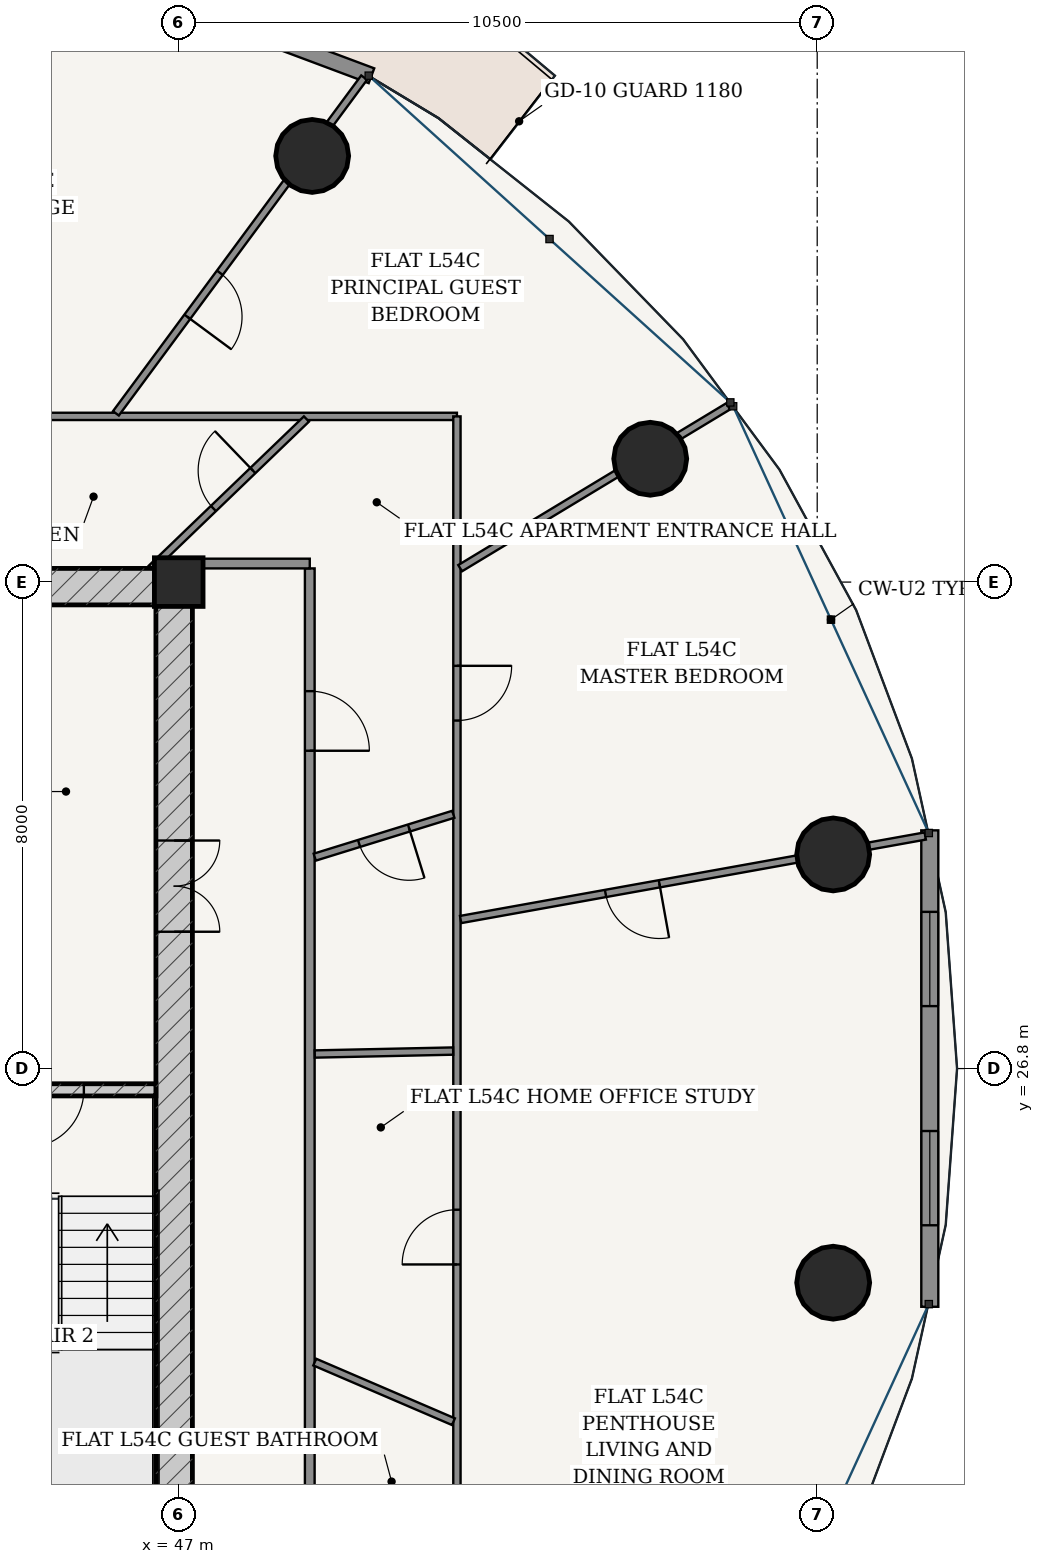
"""IFC4 building model, lengths in metres.
Left out: names, types, materials, properties, quantities, classifications, styles, units other than length and angle.
Written with IfcOpenShell. Run it as: python <this file> out.ifc"""

import sys

from ifc_helpers import new_model, si_unit, direction, frame, frame_2d, origin, origin_2d, place, context, subcontext, project, spatial, rectangle, hollow_circle, extrude, source, transform, mapped, element, fill, save


model = new_model("IFC4")
c1 = context("Model", 3, precision=1e-05, world=origin(), true_north=direction((-0.2419218956, 0.970295726276)))
c2 = subcontext(c1, "Body", "Model", "MODEL_VIEW")
j1 = project(units=[si_unit("LENGTHUNIT", "METRE"), si_unit("PLANEANGLEUNIT", "RADIAN")], contexts=[c1])
p1 = place(None, origin())
s1 = spatial("IfcSite", under=j1, at=p1, CompositionType="ELEMENT")
p2 = place(p1, origin())
s2 = spatial("IfcBuilding", under=s1, at=p2, CompositionType="ELEMENT")
p3 = place(p2, frame((0.0, 0.0, 206.0)))
s3 = spatial("IfcBuildingStorey", under=s2, at=p3, CompositionType="ELEMENT", Elevation=206.0)
p4 = place(p3, frame((47.0, 34.8, 0.0), z_axis=(0.0, 0.0, 1.0), x_axis=(1.0, 0.0, 0.0)))
e1 = element("IfcColumn", 1, at=p4, inside=s3, PredefinedType="COLUMN", context=c2, shape_type="SweptSolid", body=[
    extrude(rectangle(XDim=0.8, YDim=0.8, at=origin_2d()), origin(), (0.0, 0.0, 1.0), 3.7),
])
p5 = place(p3, frame((28.775, 34.725, 0.0), z_axis=(0.0, 0.0, 1.0), x_axis=(1.0, 0.0, 0.0)))
e2 = element("IfcWall", 2, at=p5, inside=s3, PredefinedType="SHEAR", context=c2, shape_type="SweptSolid", body=[
    extrude(rectangle(XDim=18.45, YDim=0.6, at=frame_2d((9.225, 0.0))), origin(), (0.0, 0.0, 1.0), 3.435),
])
p6 = place(p3, frame((46.925, 19.175, 0.0), z_axis=(0.0, 0.0, 1.0), x_axis=(0.0, 1.0, 0.0)))
e3 = element("IfcWall", 3, at=p6, inside=s3, PredefinedType="SHEAR", context=c2, shape_type="SweptSolid", body=[
    extrude(rectangle(XDim=15.25, YDim=0.6, at=frame_2d((7.625, 0.0))), origin(), (0.0, 0.0, 1.0), 3.435),
])
p7 = place(p6, frame((9.875, 0.0, 0.0)))
e4 = element("IfcOpeningElement", 4, at=p7, cuts=e3, PredefinedType="OPENING", context=c2, shape_type="SweptSolid", body=[
    extrude(rectangle(XDim=1.5, YDim=2.2, at=frame_2d((0.75, 1.1))), frame((0.0, 0.31, 0.0), z_axis=(0.0, -1.0, 0.0), x_axis=(1.0, 0.0, 0.0)), (0.0, 0.0, 1.0), 0.62),
])
p8 = place(p3, frame((43.305, 26.45, 0.0), z_axis=(0.0, 0.0, 1.0), x_axis=(1.0, 0.0, 0.0)))
e5 = element("IfcWall", 5, at=p8, inside=s3, PredefinedType="SOLIDWALL", context=c2, shape_type="SweptSolid", body=[
    extrude(rectangle(XDim=3.32, YDim=0.2, at=frame_2d((1.66, 0.0))), origin(), (0.0, 0.0, 1.0), 3.435),
])
p9 = place(p8, frame((1.185, 0.0, 0.0)))
e6 = element("IfcOpeningElement", 6, at=p9, cuts=e5, PredefinedType="OPENING", context=c2, shape_type="SweptSolid", body=[
    extrude(rectangle(XDim=0.95, YDim=2.15, at=frame_2d((0.475, 1.075))), frame((0.0, 0.11, 0.0), z_axis=(0.0, -1.0, 0.0), x_axis=(1.0, 0.0, 0.0)), (0.0, 0.0, 1.0), 0.22),
])
for number, where, z_axis, x_axis in (
    (7, (57.763, 30.321, 0.0), (0.0, 0.0, 1.0), (1.0, 0.0, 0.0)),
    (8, (54.754, 36.828, 0.0), (0.0, 0.0, 1.0), (1.0, 0.0, 0.0)),
    (9, (49.195, 41.808, 0.0), (0.0, 0.0, 1.0), (1.0, 0.0, 0.0)),
    (10, (57.763, 23.279, 0.0), (0.0, 0.0, 1.0), (1.0, 0.0, 0.0)),
):
    element("IfcColumn", number, at=place(p3, frame(where, z_axis=z_axis, x_axis=x_axis)), inside=s3, PredefinedType="COLUMN", context=c2, shape_type="SweptSolid", body=[
        extrude(hollow_circle(Radius=0.6, WallThickness=0.038, at=origin_2d()), origin(), (0.0, 0.0, 1.0), 3.7),
    ])
p10 = place(p3, frame((50.17, 43.127, 0.0), z_axis=(0.0, 0.0, 1.0), x_axis=(-0.936556918375, 0.350515532672, 0.0)))
e11 = element("IfcWall", 11, at=p10, inside=s3, PredefinedType="SOLIDWALL", context=c2, shape_type="SweptSolid", body=[
    extrude(rectangle(XDim=8.539, YDim=0.26, at=frame_2d((4.27, 0.0))), origin(), (0.0, 0.0, 1.0), 3.435),
])
p11 = place(p10, frame((3.594, 0.0, 0.0)))
e12 = element("IfcOpeningElement", 12, at=p11, cuts=e11, PredefinedType="OPENING", context=c2, shape_type="SweptSolid", body=[
    extrude(rectangle(XDim=1.35, YDim=2.2, at=frame_2d((0.675, 1.1))), frame((0.0, 0.14, 0.0), z_axis=(0.0, -1.0, 0.0), x_axis=(1.0, 0.0, 0.0)), (0.0, 0.0, 1.0), 0.28),
])
p12 = place(p3, frame((59.352, 22.883, 0.0), z_axis=(0.0, 0.0, 1.0), x_axis=(0.0, 1.0, 0.0)))
e13 = element("IfcWall", 13, at=p12, inside=s3, PredefinedType="SOLIDWALL", context=c2, shape_type="SweptSolid", body=[
    extrude(rectangle(XDim=7.835, YDim=0.28, at=frame_2d((3.917, 0.0))), origin(), (0.0, 0.0, 1.0), 3.435),
])
p13 = place(p12, frame((1.34, 0.0, 0.85)))
e14 = element("IfcOpeningElement", 14, at=p13, cuts=e13, PredefinedType="OPENING", context=c2, shape_type="SweptSolid", body=[
    extrude(rectangle(XDim=1.55, YDim=1.95, at=frame_2d((0.775, 0.975))), frame((0.0, 0.15, 0.0), z_axis=(0.0, -1.0, 0.0), x_axis=(1.0, 0.0, 0.0)), (0.0, 0.0, 1.0), 0.3),
])
p14 = place(p12, frame((4.944, 0.0, 0.85)))
e15 = element("IfcOpeningElement", 15, at=p14, cuts=e13, PredefinedType="OPENING", context=c2, shape_type="SweptSolid", body=[
    extrude(rectangle(XDim=1.55, YDim=1.95, at=frame_2d((0.775, 0.975))), frame((0.0, 0.15, 0.0), z_axis=(0.0, -1.0, 0.0), x_axis=(1.0, 0.0, 0.0)), (0.0, 0.0, 1.0), 0.3),
])
p15 = place(p3, frame((49.155, 16.725, 0.0), z_axis=(0.0, 0.0, 1.0), x_axis=(0.0, 1.0, 0.0)))
e16 = element("IfcWall", 16, at=p15, inside=s3, PredefinedType="PARTITIONING", context=c2, shape_type="SweptSolid", body=[
    extrude(rectangle(XDim=18.3, YDim=0.16, at=frame_2d((9.15, 0.0))), origin(), (0.0, 0.0, 1.0), 2.951),
])
p16 = place(p15, frame((15.302, 0.0, 0.0)))
e17 = element("IfcOpeningElement", 17, at=p16, cuts=e16, PredefinedType="OPENING", context=c2, shape_type="SweptSolid", body=[
    extrude(rectangle(XDim=0.98, YDim=2.2, at=frame_2d((0.49, 1.1))), frame((0.0, 0.09, 0.0), z_axis=(0.0, -1.0, 0.0), x_axis=(1.0, 0.0, 0.0)), (0.0, 0.0, 1.0), 0.18),
])
p17 = place(p3, frame((47.225, 35.105, 0.0), z_axis=(0.0, 0.0, 1.0), x_axis=(1.0, 0.0, 0.0)))
e18 = element("IfcWall", 18, at=p17, inside=s3, PredefinedType="PARTITIONING", context=c2, shape_type="SweptSolid", body=[
    extrude(rectangle(XDim=1.93, YDim=0.16, at=frame_2d((0.965, 0.0))), origin(), (0.0, 0.0, 1.0), 3.435),
])
p18 = place(p3, frame((44.725, 37.525, 0.0), z_axis=(0.0, 0.0, 1.0), x_axis=(1.0, 0.0, 0.0)))
e19 = element("IfcWall", 19, at=p18, inside=s3, PredefinedType="PARTITIONING", context=c2, shape_type="SweptSolid", body=[
    extrude(rectangle(XDim=6.85, YDim=0.12, at=frame_2d((3.425, 0.0))), origin(), (0.0, 0.0, 1.0), 2.951),
])
p19 = place(p3, frame((51.575, 37.525, 0.0), z_axis=(0.0, 0.0, 1.0), x_axis=(0.0, -1.0, 0.0)))
e20 = element("IfcWall", 20, at=p19, inside=s3, PredefinedType="PARTITIONING", context=c2, shape_type="SweptSolid", body=[
    extrude(rectangle(XDim=22.89, YDim=0.12, at=frame_2d((11.445, 0.0))), origin(), (0.0, 0.0, 1.0), 2.951),
])
p20 = place(p19, frame((4.102, 0.0, 0.0)))
e21 = element("IfcOpeningElement", 21, at=p20, cuts=e20, PredefinedType="OPENING", context=c2, shape_type="SweptSolid", body=[
    extrude(rectangle(XDim=0.9, YDim=2.15, at=frame_2d((0.45, 1.075))), frame((0.0, 0.07, 0.0), z_axis=(0.0, -1.0, 0.0), x_axis=(1.0, 0.0, 0.0)), (0.0, 0.0, 1.0), 0.14),
])
p21 = place(p19, frame((19.163, 0.0, 0.0)))
e22 = element("IfcOpeningElement", 22, at=p21, cuts=e20, PredefinedType="OPENING", context=c2, shape_type="SweptSolid", body=[
    extrude(rectangle(XDim=0.86, YDim=2.15, at=frame_2d((0.43, 1.075))), frame((0.0, 0.07, 0.0), z_axis=(0.0, -1.0, 0.0), x_axis=(1.0, 0.0, 0.0)), (0.0, 0.0, 1.0), 0.14),
])
p22 = place(p19, frame((13.046, 0.0, 0.0)))
e23 = element("IfcOpeningElement", 23, at=p22, cuts=e20, PredefinedType="OPENING", context=c2, shape_type="SweptSolid", body=[
    extrude(rectangle(XDim=0.9, YDim=2.15, at=frame_2d((0.45, 1.075))), frame((0.0, 0.07, 0.0), z_axis=(0.0, -1.0, 0.0), x_axis=(1.0, 0.0, 0.0)), (0.0, 0.0, 1.0), 0.14),
])
p23 = place(p3, frame((51.636, 29.251, 0.0), z_axis=(0.0, 0.0, 1.0), x_axis=(0.984223216243, 0.176931231294, 0.0)))
e24 = element("IfcWall", 24, at=p23, inside=s3, PredefinedType="PARTITIONING", context=c2, shape_type="SweptSolid", body=[
    extrude(rectangle(XDim=7.763, YDim=0.12, at=frame_2d((3.882, 0.0))), origin(), (0.0, 0.0, 1.0), 2.951),
])
p24 = place(p23, frame((2.421, 0.0, 0.0)))
e25 = element("IfcOpeningElement", 25, at=p24, cuts=e24, PredefinedType="OPENING", context=c2, shape_type="SweptSolid", body=[
    extrude(rectangle(XDim=0.9, YDim=2.15, at=frame_2d((0.45, 1.075))), frame((0.0, 0.07, 0.0), z_axis=(0.0, -1.0, 0.0), x_axis=(1.0, 0.0, 0.0)), (0.0, 0.0, 1.0), 0.14),
])
p25 = place(p3, frame((51.628, 35.029, 0.0), z_axis=(0.0, 0.0, 1.0), x_axis=(0.856041879651, 0.516906471505, 0.0)))
e26 = element("IfcWall", 26, at=p25, inside=s3, PredefinedType="PARTITIONING", context=c2, shape_type="SweptSolid", body=[
    extrude(rectangle(XDim=5.149, YDim=0.12, at=frame_2d((2.574, 0.0))), origin(), (0.0, 0.0, 1.0), 2.951),
])
p26 = place(p3, frame((45.967, 37.575, 0.0), z_axis=(0.0, 0.0, 1.0), x_axis=(0.59452500855, 0.804077119565, 0.0)))
e27 = element("IfcWall", 27, at=p26, inside=s3, PredefinedType="PARTITIONING", context=c2, shape_type="SweptSolid", body=[
    extrude(rectangle(XDim=6.867, YDim=0.12, at=frame_2d((3.434, 0.0))), origin(), (0.0, 0.0, 1.0), 2.951),
])
p27 = place(p26, frame((1.975, 0.0, 0.0)))
e28 = element("IfcOpeningElement", 28, at=p27, cuts=e27, PredefinedType="OPENING", context=c2, shape_type="SweptSolid", body=[
    extrude(rectangle(XDim=0.9, YDim=2.15, at=frame_2d((0.45, 1.075))), frame((0.0, 0.07, 0.0), z_axis=(0.0, -1.0, 0.0), x_axis=(1.0, 0.0, 0.0)), (0.0, 0.0, 1.0), 0.14),
])
p28 = place(p3, frame((49.237, 21.973, 0.0), z_axis=(0.0, 0.0, 1.0), x_axis=(0.91880901308, -0.394702416364, 0.0)))
e29 = element("IfcWall", 29, at=p28, inside=s3, PredefinedType="PARTITIONING", context=c2, shape_type="SweptSolid", body=[
    extrude(rectangle(XDim=2.483, YDim=0.12, at=frame_2d((1.241, 0.0))), origin(), (0.0, 0.0, 1.0), 3.11),
])
p29 = place(p3, frame((49.237, 27.039, 0.0), z_axis=(0.0, 0.0, 1.0), x_axis=(0.999772223164, 0.021342487922, 0.0)))
e30 = element("IfcWall", 30, at=p29, inside=s3, PredefinedType="PARTITIONING", context=c2, shape_type="SweptSolid", body=[
    extrude(rectangle(XDim=2.276, YDim=0.12, at=frame_2d((1.138, 0.0))), origin(), (0.0, 0.0, 1.0), 3.435),
])
p30 = place(p3, frame((49.237, 30.277, 0.0), z_axis=(0.0, 0.0, 1.0), x_axis=(0.955326488692, 0.295552533406, 0.0)))
e31 = element("IfcWall", 31, at=p30, inside=s3, PredefinedType="PARTITIONING", context=c2, shape_type="SweptSolid", body=[
    extrude(rectangle(XDim=2.386, YDim=0.12, at=frame_2d((1.193, 0.0))), origin(), (0.0, 0.0, 1.0), 3.435),
])
p31 = place(p30, frame((0.763, 0.0, 0.0)))
e32 = element("IfcOpeningElement", 32, at=p31, cuts=e31, PredefinedType="OPENING", context=c2, shape_type="SweptSolid", body=[
    extrude(rectangle(XDim=0.86, YDim=2.15, at=frame_2d((0.43, 1.075))), frame((0.0, 0.07, 0.0), z_axis=(0.0, -1.0, 0.0), x_axis=(1.0, 0.0, 0.0)), (0.0, 0.0, 1.0), 0.14),
])
p32 = place(p3, frame((46.549, 35.026, 0.0), z_axis=(0.0, 0.0, 1.0), x_axis=(0.720557461206, 0.693395230082, 0.0)))
e33 = element("IfcWall", 33, at=p32, inside=s3, PredefinedType="PARTITIONING", context=c2, shape_type="SweptSolid", body=[
    extrude(rectangle(XDim=3.541, YDim=0.12, at=frame_2d((1.771, 0.0))), origin(), (0.0, 0.0, 1.0), 2.951),
])
p33 = place(p32, frame((1.419, 0.0, 0.0)))
e34 = element("IfcOpeningElement", 34, at=p33, cuts=e33, PredefinedType="OPENING", context=c2, shape_type="SweptSolid", body=[
    extrude(rectangle(XDim=0.9, YDim=2.15, at=frame_2d((0.45, 1.075))), frame((0.0, 0.07, 0.0), z_axis=(0.0, -1.0, 0.0), x_axis=(1.0, 0.0, 0.0)), (0.0, 0.0, 1.0), 0.14),
])
m1 = source(origin(), c2, "Body", "SweptSolid", [
    extrude(rectangle(XDim=1.55, YDim=1.95, at=frame_2d((0.775, 0.975))), frame((0.0, 0.03, 0.0), z_axis=(0.0, -1.0, 0.0), x_axis=(1.0, 0.0, 0.0)), (0.0, 0.0, 1.0), 0.06),
])
p34 = place(p13, origin())
e35 = element("IfcWindow", 35, at=p34, inside=s3, PartitioningType="SINGLE_PANEL", PredefinedType="WINDOW", context=c2, shape_type="MappedRepresentation", body=[
    mapped(m1, transform((0.0, 0.0, 0.0), scale=1.0)),
])
fill(e14, e35)
p35 = place(p14, origin())
e36 = element("IfcWindow", 36, at=p35, inside=s3, PartitioningType="SINGLE_PANEL", PredefinedType="WINDOW", context=c2, shape_type="MappedRepresentation", body=[
    mapped(m1, transform((0.0, 0.0, 0.0), scale=1.0)),
])
fill(e15, e36)
m2 = source(origin(), c2, "Body", "SweptSolid", [
    extrude(rectangle(XDim=1.5, YDim=2.2, at=frame_2d((0.75, 1.1))), frame((0.0, 0.025, 0.0), z_axis=(0.0, -1.0, 0.0), x_axis=(1.0, 0.0, 0.0)), (0.0, 0.0, 1.0), 0.05),
])
p36 = place(p7, frame((1.5, 0.0, 0.0), z_axis=(0.0, 0.0, 1.0), x_axis=(-1.0, 0.0, 0.0)))
e37 = element("IfcDoor", 37, at=p36, inside=s3, OperationType="DOUBLE_DOOR_SINGLE_SWING", PredefinedType="DOOR", context=c2, shape_type="MappedRepresentation", body=[
    mapped(m2, transform((0.0, 0.0, 0.0), scale=1.0)),
])
fill(e4, e37)
m3 = source(origin(), c2, "Body", "SweptSolid", [
    extrude(rectangle(XDim=0.95, YDim=2.15, at=frame_2d((0.475, 1.075))), frame((0.0, 0.025, 0.0), z_axis=(0.0, -1.0, 0.0), x_axis=(1.0, 0.0, 0.0)), (0.0, 0.0, 1.0), 0.05),
])
p37 = place(p9, frame((0.95, 0.0, 0.0), z_axis=(0.0, 0.0, 1.0), x_axis=(-1.0, 0.0, 0.0)))
e38 = element("IfcDoor", 38, at=p37, inside=s3, OperationType="SINGLE_SWING_RIGHT", PredefinedType="DOOR", context=c2, shape_type="MappedRepresentation", body=[
    mapped(m3, transform((0.0, 0.0, 0.0), scale=1.0)),
])
fill(e6, e38)
m4 = source(origin(), c2, "Body", "SweptSolid", [
    extrude(rectangle(XDim=0.98, YDim=2.2, at=frame_2d((0.49, 1.1))), frame((0.0, 0.025, 0.0), z_axis=(0.0, -1.0, 0.0), x_axis=(1.0, 0.0, 0.0)), (0.0, 0.0, 1.0), 0.05),
])
p38 = place(p16, frame((0.98, 0.0, 0.0), z_axis=(0.0, 0.0, 1.0), x_axis=(-1.0, 0.0, 0.0)))
e39 = element("IfcDoor", 39, at=p38, inside=s3, OperationType="SINGLE_SWING_RIGHT", PredefinedType="DOOR", context=c2, shape_type="MappedRepresentation", body=[
    mapped(m4, transform((0.0, 0.0, 0.0), scale=1.0)),
])
fill(e17, e39)
m5 = source(origin(), c2, "Body", "SweptSolid", [
    extrude(rectangle(XDim=0.86, YDim=2.15, at=frame_2d((0.43, 1.075))), frame((0.0, 0.025, 0.0), z_axis=(0.0, -1.0, 0.0), x_axis=(1.0, 0.0, 0.0)), (0.0, 0.0, 1.0), 0.05),
])
p39 = place(p31, frame((0.86, 0.0, 0.0), z_axis=(0.0, 0.0, 1.0), x_axis=(-1.0, 0.0, 0.0)))
e40 = element("IfcDoor", 40, at=p39, inside=s3, OperationType="SINGLE_SWING_LEFT", PredefinedType="DOOR", context=c2, shape_type="MappedRepresentation", body=[
    mapped(m5, transform((0.0, 0.0, 0.0), scale=1.0)),
])
fill(e32, e40)
m6 = source(origin(), c2, "Body", "SweptSolid", [
    extrude(rectangle(XDim=0.9, YDim=2.15, at=frame_2d((0.45, 1.075))), frame((0.0, 0.025, 0.0), z_axis=(0.0, -1.0, 0.0), x_axis=(1.0, 0.0, 0.0)), (0.0, 0.0, 1.0), 0.05),
])
p40 = place(p33, origin())
e41 = element("IfcDoor", 41, at=p40, inside=s3, OperationType="SINGLE_SWING_RIGHT", PredefinedType="DOOR", context=c2, shape_type="MappedRepresentation", body=[
    mapped(m6, transform((0.0, 0.0, 0.0), scale=1.0)),
])
fill(e34, e41)
p41 = place(p20, origin())
e42 = element("IfcDoor", 42, at=p41, inside=s3, OperationType="SINGLE_SWING_LEFT", PredefinedType="DOOR", context=c2, shape_type="MappedRepresentation", body=[
    mapped(m6, transform((0.0, 0.0, 0.0), scale=1.0)),
])
fill(e21, e42)
p42 = place(p27, frame((0.9, 0.0, 0.0), z_axis=(0.0, 0.0, 1.0), x_axis=(-1.0, 0.0, 0.0)))
e43 = element("IfcDoor", 43, at=p42, inside=s3, OperationType="SINGLE_SWING_RIGHT", PredefinedType="DOOR", context=c2, shape_type="MappedRepresentation", body=[
    mapped(m6, transform((0.0, 0.0, 0.0), scale=1.0)),
])
fill(e28, e43)
p43 = place(p24, frame((0.9, 0.0, 0.0), z_axis=(0.0, 0.0, 1.0), x_axis=(-1.0, 0.0, 0.0)))
e44 = element("IfcDoor", 44, at=p43, inside=s3, OperationType="SINGLE_SWING_LEFT", PredefinedType="DOOR", context=c2, shape_type="MappedRepresentation", body=[
    mapped(m6, transform((0.0, 0.0, 0.0), scale=1.0)),
])
fill(e25, e44)
p44 = place(p22, frame((0.9, 0.0, 0.0), z_axis=(0.0, 0.0, 1.0), x_axis=(-1.0, 0.0, 0.0)))
e45 = element("IfcDoor", 45, at=p44, inside=s3, OperationType="SINGLE_SWING_LEFT", PredefinedType="DOOR", context=c2, shape_type="MappedRepresentation", body=[
    mapped(m6, transform((0.0, 0.0, 0.0), scale=1.0)),
])
fill(e23, e45)
save(model, sys.argv[1])
